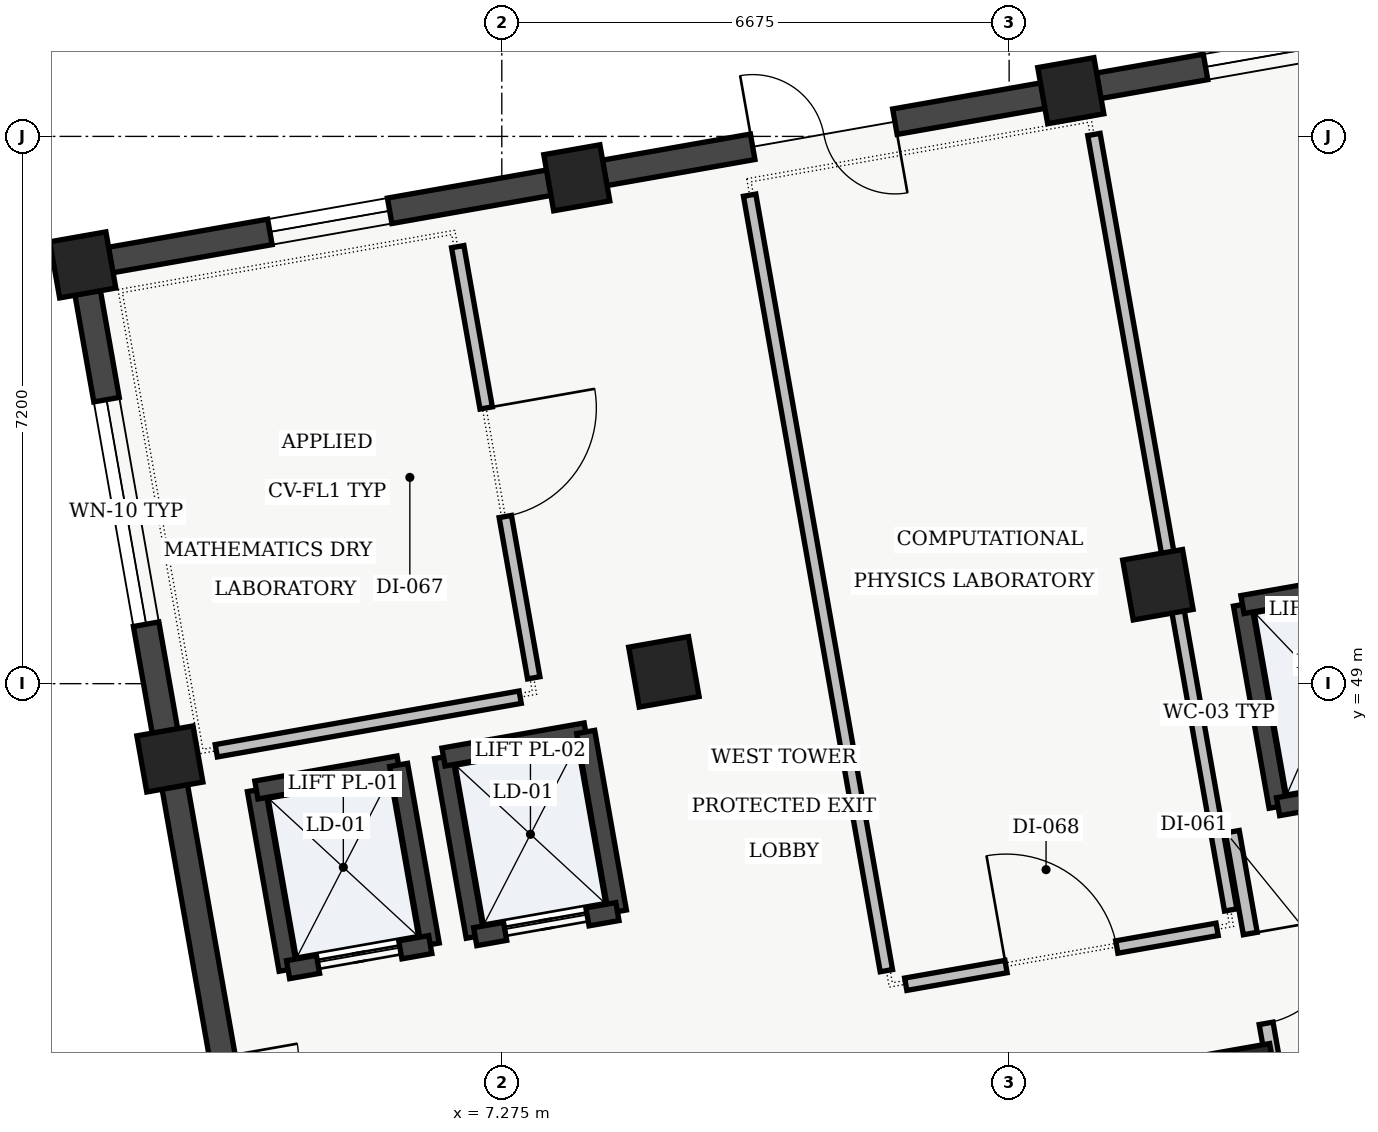
"""IFC4 building model, lengths in metres.
Left out: names, types, materials, properties, quantities, classifications, styles, units other than length and angle.
Written with IfcOpenShell. Run it as: python <this file> out.ifc"""

import sys

from ifc_helpers import new_model, si_unit, direction, frame, frame_2d, origin, origin_2d, place, context, subcontext, project, spatial, rectangle, extrude, element, fill, save


model = new_model("IFC4")
c1 = context("Model", 3, precision=1e-05, world=origin(), true_north=direction((0.0, 1.0)))
c2 = subcontext(c1, "Body", "Model", "MODEL_VIEW")
j1 = project(units=[si_unit("LENGTHUNIT", "METRE"), si_unit("PLANEANGLEUNIT", "RADIAN")], contexts=[c1])
p1 = place(None, origin())
s1 = spatial("IfcSite", under=j1, at=p1, CompositionType="ELEMENT")
p2 = place(p1, origin())
s2 = spatial("IfcBuilding", under=s1, at=p2, CompositionType="ELEMENT")
p3 = place(p2, origin())
s3 = spatial("IfcBuildingStorey", under=s2, at=p3, CompositionType="ELEMENT", Elevation=0.0)
for number, where, z_axis, x_axis in (
    (1, (2.908, 48.01, 0.0), (0.0, 0.0, 1.0), (0.985, 0.174, 0.0)),
    (2, (1.762, 54.509, 0.0), (0.0, 0.0, 1.0), (0.985, 0.174, 0.0)),
):
    element("IfcColumn", number, at=place(p3, frame(where, z_axis=z_axis, x_axis=x_axis)), inside=s3, PredefinedType="COLUMN", context=c2, shape_type="SweptSolid", body=[
        extrude(rectangle(XDim=0.75, YDim=0.75, at=origin_2d()), origin(), (0.0, 0.0, 1.0), 4.92),
    ])
p4 = place(p3, frame((9.407, 49.156, 0.0), z_axis=(0.0, 0.0, 1.0), x_axis=(0.984807753012, 0.173648177667, 0.0)))
e3 = element("IfcColumn", 3, at=p4, inside=s3, PredefinedType="COLUMN", context=c2, shape_type="SweptSolid", body=[
    extrude(rectangle(XDim=0.8, YDim=0.8, at=origin_2d()), origin(), (0.0, 0.0, 1.0), 4.92),
])
p5 = place(p3, frame((8.261, 55.655, 0.0), z_axis=(0.0, 0.0, 1.0), x_axis=(0.984807753012, 0.173648177667, 0.0)))
e4 = element("IfcColumn", 4, at=p5, inside=s3, PredefinedType="COLUMN", context=c2, shape_type="SweptSolid", body=[
    extrude(rectangle(XDim=0.75, YDim=0.75, at=origin_2d()), origin(), (0.0, 0.0, 1.0), 4.92),
])
for number, where, z_axis, x_axis in (
    (5, (17.053, 43.802, 0.0), (0.0, 0.0, 1.0), (0.985, 0.174, 0.0)),
    (6, (15.907, 50.302, 0.0), (0.0, 0.0, 1.0), (0.985, 0.174, 0.0)),
):
    element("IfcColumn", number, at=place(p3, frame(where, z_axis=z_axis, x_axis=x_axis)), inside=s3, PredefinedType="COLUMN", context=c2, shape_type="SweptSolid", body=[
        extrude(rectangle(XDim=0.8, YDim=0.8, at=origin_2d()), origin(), (0.0, 0.0, 1.0), 4.92),
    ])
p6 = place(p3, frame((14.761, 56.801, 0.0), z_axis=(0.0, 0.0, 1.0), x_axis=(0.984807753012, 0.173648177667, 0.0)))
e7 = element("IfcColumn", 7, at=p6, inside=s3, PredefinedType="COLUMN", context=c2, shape_type="SweptSolid", body=[
    extrude(rectangle(XDim=0.75, YDim=0.75, at=origin_2d()), origin(), (0.0, 0.0, 1.0), 4.92),
])
p7 = place(p3, frame((3.99, 41.874, 0.0), z_axis=(0.0, 0.0, 1.0), x_axis=(-0.1736474839, 0.984807875342, 0.0)))
e8 = element("IfcWall", 8, at=p7, inside=s3, PredefinedType="SOLIDWALL", context=c2, shape_type="SweptSolid", body=[
    extrude(rectangle(XDim=5.86, YDim=0.34, at=frame_2d((2.93, 0.0))), origin(), (0.0, 0.0, 1.0), 4.455),
])
p8 = place(p7, frame((0.25, 0.0, 0.0)))
e9 = element("IfcOpeningElement", 9, at=p8, cuts=e8, PredefinedType="OPENING", context=c2, shape_type="SweptSolid", body=[
    extrude(rectangle(XDim=2.0, YDim=2.25, at=frame_2d((1.0, 1.125))), frame((0.0, 0.17, 0.0), z_axis=(0.0, -1.0, 0.0), x_axis=(1.0, 0.0, 0.0)), (0.0, 0.0, 1.0), 0.34),
])
p9 = place(p3, frame((2.844, 48.374, 0.0), z_axis=(0.0, 0.0, 1.0), x_axis=(-0.1736474839, 0.984807875342, 0.0)))
e10 = element("IfcWall", 10, at=p9, inside=s3, PredefinedType="SOLIDWALL", context=c2, shape_type="SweptSolid", body=[
    extrude(rectangle(XDim=5.86, YDim=0.34, at=frame_2d((2.93, 0.0))), origin(), (0.0, 0.0, 1.0), 4.455),
])
p10 = place(p9, frame((1.43, 0.0, 0.95)))
e11 = element("IfcOpeningElement", 11, at=p10, cuts=e10, PredefinedType="OPENING", context=c2, shape_type="SweptSolid", body=[
    extrude(rectangle(XDim=3.0, YDim=1.65, at=frame_2d((1.5, 0.825))), frame((0.0, 0.17, 0.0), z_axis=(0.0, -1.0, 0.0), x_axis=(1.0, 0.0, 0.0)), (0.0, 0.0, 1.0), 0.34),
])
p11 = place(p3, frame((2.126, 54.573, 0.0), z_axis=(0.0, 0.0, 1.0), x_axis=(0.984807875342, 0.1736474839, 0.0)))
e12 = element("IfcWall", 12, at=p11, inside=s3, PredefinedType="SOLIDWALL", context=c2, shape_type="SweptSolid", body=[
    extrude(rectangle(XDim=5.86, YDim=0.34, at=frame_2d((2.93, 0.0))), origin(), (0.0, 0.0, 1.0), 4.455),
])
p12 = place(p11, frame((2.13, 0.0, 0.95)))
e13 = element("IfcOpeningElement", 13, at=p12, cuts=e12, PredefinedType="OPENING", context=c2, shape_type="SweptSolid", body=[
    extrude(rectangle(XDim=1.6, YDim=1.4, at=frame_2d((0.8, 0.7))), frame((0.0, 0.17, 0.0), z_axis=(0.0, -1.0, 0.0), x_axis=(1.0, 0.0, 0.0)), (0.0, 0.0, 1.0), 0.34),
])
p13 = place(p3, frame((8.626, 55.719, 0.0), z_axis=(0.0, 0.0, 1.0), x_axis=(0.98480661901, 0.173654608793, 0.0)))
e14 = element("IfcWall", 14, at=p13, inside=s3, PredefinedType="SOLIDWALL", context=c2, shape_type="SweptSolid", body=[
    extrude(rectangle(XDim=5.86, YDim=0.34, at=frame_2d((2.93, 0.0))), origin(), (0.0, 0.0, 1.0), 4.455),
])
p14 = place(p13, frame((1.98, 0.0, 0.0)))
e15 = element("IfcOpeningElement", 15, at=p14, cuts=e14, PredefinedType="OPENING", context=c2, shape_type="SweptSolid", body=[
    extrude(rectangle(XDim=1.9, YDim=2.25, at=frame_2d((0.95, 1.125))), frame((0.0, 0.17, 0.0), z_axis=(0.0, -1.0, 0.0), x_axis=(1.0, 0.0, 0.0)), (0.0, 0.0, 1.0), 0.34),
])
p15 = place(p3, frame((15.125, 56.865, 0.0), z_axis=(0.0, 0.0, 1.0), x_axis=(0.984807875342, 0.1736474839, 0.0)))
e16 = element("IfcWall", 16, at=p15, inside=s3, PredefinedType="SOLIDWALL", context=c2, shape_type="SweptSolid", body=[
    extrude(rectangle(XDim=5.86, YDim=0.34, at=frame_2d((2.93, 0.0))), origin(), (0.0, 0.0, 1.0), 4.455),
])
p16 = place(p15, frame((1.43, 0.0, 0.95)))
e17 = element("IfcOpeningElement", 17, at=p16, cuts=e16, PredefinedType="OPENING", context=c2, shape_type="SweptSolid", body=[
    extrude(rectangle(XDim=3.0, YDim=1.65, at=frame_2d((1.5, 0.825))), frame((0.0, 0.17, 0.0), z_axis=(0.0, -1.0, 0.0), x_axis=(1.0, 0.0, 0.0)), (0.0, 0.0, 1.0), 0.34),
])
p17 = place(p3, frame((17.488, 47.382, 0.0), z_axis=(0.0, 0.0, 1.0), x_axis=(-0.173615102578, 0.98481358447, 0.0)))
e18 = element("IfcWall", 18, at=p17, inside=s3, PredefinedType="SHEAR", context=c2, shape_type="SweptSolid", body=[
    extrude(rectangle(XDim=2.7, YDim=0.24, at=frame_2d((1.35, 0.0))), origin(), (0.0, 0.0, 1.0), 4.88),
])
p18 = place(p3, frame((17.02, 50.041, 0.0), z_axis=(0.0, 0.0, 1.0), x_axis=(0.984815882103, 0.173602068988, 0.0)))
e19 = element("IfcWall", 19, at=p18, inside=s3, PredefinedType="SHEAR", context=c2, shape_type="SweptSolid", body=[
    extrude(rectangle(XDim=1.9, YDim=0.24, at=frame_2d((0.95, 0.0))), origin(), (0.0, 0.0, 1.0), 4.88),
])
p19 = place(p3, frame((19.359, 47.712, 0.0), z_axis=(0.0, 0.0, 1.0), x_axis=(-0.984815882103, -0.173602068988, 0.0)))
e20 = element("IfcWall", 20, at=p19, inside=s3, PredefinedType="SHEAR", context=c2, shape_type="SweptSolid", body=[
    extrude(rectangle(XDim=1.9, YDim=0.24, at=frame_2d((0.95, 0.0))), origin(), (0.0, 0.0, 1.0), 4.88),
])
p20 = place(p19, frame((0.325, 0.0, 0.0)))
e21 = element("IfcOpeningElement", 21, at=p20, cuts=e20, PredefinedType="OPENING", context=c2, shape_type="SweptSolid", body=[
    extrude(rectangle(XDim=1.25, YDim=2.2, at=frame_2d((0.625, 1.1))), frame((0.0, 0.12, 0.0), z_axis=(0.0, -1.0, 0.0), x_axis=(1.0, 0.0, 0.0)), (0.0, 0.0, 1.0), 0.24),
])
p21 = place(p3, frame((4.463, 45.237, 0.0), z_axis=(0.0, 0.0, 1.0), x_axis=(-0.173646056486, 0.984808127031, 0.0)))
e22 = element("IfcWall", 22, at=p21, inside=s3, PredefinedType="SHEAR", context=c2, shape_type="SweptSolid", body=[
    extrude(rectangle(XDim=2.4, YDim=0.24, at=frame_2d((1.2, 0.0))), origin(), (0.0, 0.0, 1.0), 4.88),
])
p22 = place(p3, frame((4.046, 47.601, 0.0), z_axis=(0.0, 0.0, 1.0), x_axis=(0.984793905749, 0.173726691098, 0.0)))
e23 = element("IfcWall", 23, at=p22, inside=s3, PredefinedType="SHEAR", context=c2, shape_type="SweptSolid", body=[
    extrude(rectangle(XDim=1.9, YDim=0.24, at=frame_2d((0.95, 0.0))), origin(), (0.0, 0.0, 1.0), 4.88),
])
p23 = place(p3, frame((5.917, 47.931, 0.0), z_axis=(0.0, 0.0, 1.0), x_axis=(0.173646056486, -0.984808127031, 0.0)))
e24 = element("IfcWall", 24, at=p23, inside=s3, PredefinedType="SHEAR", context=c2, shape_type="SweptSolid", body=[
    extrude(rectangle(XDim=2.4, YDim=0.24, at=frame_2d((1.2, 0.0))), origin(), (0.0, 0.0, 1.0), 4.88),
])
p24 = place(p3, frame((6.334, 45.567, 0.0), z_axis=(0.0, 0.0, 1.0), x_axis=(-0.984793905749, -0.173726691098, 0.0)))
e25 = element("IfcWall", 25, at=p24, inside=s3, PredefinedType="SHEAR", context=c2, shape_type="SweptSolid", body=[
    extrude(rectangle(XDim=1.9, YDim=0.24, at=frame_2d((0.95, 0.0))), origin(), (0.0, 0.0, 1.0), 4.88),
])
p25 = place(p24, frame((0.4, 0.0, 0.0)))
e26 = element("IfcOpeningElement", 26, at=p25, cuts=e25, PredefinedType="OPENING", context=c2, shape_type="SweptSolid", body=[
    extrude(rectangle(XDim=1.1, YDim=2.2, at=frame_2d((0.55, 1.1))), frame((0.0, 0.12, 0.0), z_axis=(0.0, -1.0, 0.0), x_axis=(1.0, 0.0, 0.0)), (0.0, 0.0, 1.0), 0.24),
])
p26 = place(p3, frame((6.925, 45.671, 0.0), z_axis=(0.0, 0.0, 1.0), x_axis=(-0.173646056486, 0.984808127031, 0.0)))
e27 = element("IfcWall", 27, at=p26, inside=s3, PredefinedType="SHEAR", context=c2, shape_type="SweptSolid", body=[
    extrude(rectangle(XDim=2.4, YDim=0.24, at=frame_2d((1.2, 0.0))), origin(), (0.0, 0.0, 1.0), 4.88),
])
p27 = place(p3, frame((6.508, 48.035, 0.0), z_axis=(0.0, 0.0, 1.0), x_axis=(0.984793905749, 0.173726691098, 0.0)))
e28 = element("IfcWall", 28, at=p27, inside=s3, PredefinedType="SHEAR", context=c2, shape_type="SweptSolid", body=[
    extrude(rectangle(XDim=1.9, YDim=0.24, at=frame_2d((0.95, 0.0))), origin(), (0.0, 0.0, 1.0), 4.88),
])
p28 = place(p3, frame((8.379, 48.365, 0.0), z_axis=(0.0, 0.0, 1.0), x_axis=(0.173646056486, -0.984808127031, 0.0)))
e29 = element("IfcWall", 29, at=p28, inside=s3, PredefinedType="SHEAR", context=c2, shape_type="SweptSolid", body=[
    extrude(rectangle(XDim=2.4, YDim=0.24, at=frame_2d((1.2, 0.0))), origin(), (0.0, 0.0, 1.0), 4.88),
])
p29 = place(p3, frame((8.796, 46.001, 0.0), z_axis=(0.0, 0.0, 1.0), x_axis=(-0.984793905749, -0.173726691098, 0.0)))
e30 = element("IfcWall", 30, at=p29, inside=s3, PredefinedType="SHEAR", context=c2, shape_type="SweptSolid", body=[
    extrude(rectangle(XDim=1.9, YDim=0.24, at=frame_2d((0.95, 0.0))), origin(), (0.0, 0.0, 1.0), 4.88),
])
p30 = place(p29, frame((0.4, 0.0, 0.0)))
e31 = element("IfcOpeningElement", 31, at=p30, cuts=e30, PredefinedType="OPENING", context=c2, shape_type="SweptSolid", body=[
    extrude(rectangle(XDim=1.1, YDim=2.2, at=frame_2d((0.55, 1.1))), frame((0.0, 0.12, 0.0), z_axis=(0.0, -1.0, 0.0), x_axis=(1.0, 0.0, 0.0)), (0.0, 0.0, 1.0), 0.24),
])
p31 = place(p3, frame((16.886, 47.052, 0.0), z_axis=(0.0, 0.0, 1.0), x_axis=(0.173621956536, -0.984812376145, 0.0)))
e32 = element("IfcWall", 32, at=p31, inside=s3, PredefinedType="SOLIDWALL", context=c2, shape_type="SweptSolid", body=[
    extrude(rectangle(XDim=3.41, YDim=0.185, at=frame_2d((1.705, 0.0))), origin(), (0.0, 0.0, 1.0), 4.55),
])
p32 = place(p31, frame((1.36, 0.0, 0.0)))
e33 = element("IfcOpeningElement", 33, at=p32, cuts=e32, PredefinedType="OPENING", context=c2, shape_type="SweptSolid", body=[
    extrude(rectangle(XDim=1.2, YDim=2.15, at=frame_2d((0.6, 1.075))), frame((0.0, 0.093, 0.0), z_axis=(0.0, -1.0, 0.0), x_axis=(1.0, 0.0, 0.0)), (0.0, 0.0, 1.0), 0.185),
])
p33 = place(p3, frame((3.518, 48.117, 0.0), z_axis=(0.0, 0.0, 1.0), x_axis=(0.984816834462, 0.173596666326, 0.0)))
e34 = element("IfcWall", 34, at=p33, inside=s3, PredefinedType="PARTITIONING", context=c2, shape_type="SweptSolid", body=[
    extrude(rectangle(XDim=4.06, YDim=0.165, at=frame_2d((2.03, 0.0))), origin(), (0.0, 0.0, 1.0), 4.155),
])
p34 = place(p3, frame((7.695, 49.077, 0.0), z_axis=(0.0, 0.0, 1.0), x_axis=(-0.173649928941, 0.984807444214, 0.0)))
e35 = element("IfcWall", 35, at=p34, inside=s3, PredefinedType="PARTITIONING", context=c2, shape_type="SweptSolid", body=[
    extrude(rectangle(XDim=5.76, YDim=0.165, at=frame_2d((2.88, 0.0))), origin(), (0.0, 0.0, 1.0), 4.55),
])
p35 = place(p34, frame((2.155, 0.0, 0.0)))
e36 = element("IfcOpeningElement", 36, at=p35, cuts=e35, PredefinedType="OPENING", context=c2, shape_type="SweptSolid", body=[
    extrude(rectangle(XDim=1.45, YDim=2.08, at=frame_2d((0.725, 1.04))), frame((0.0, 0.083, 0.0), z_axis=(0.0, -1.0, 0.0), x_axis=(1.0, 0.0, 0.0)), (0.0, 0.0, 1.0), 0.165),
])
p36 = place(p3, frame((12.59, 45.046, 0.0), z_axis=(0.0, 0.0, 1.0), x_axis=(0.984805411783, 0.173661454915, 0.0)))
e37 = element("IfcWall", 37, at=p36, inside=s3, PredefinedType="PARTITIONING", context=c2, shape_type="SweptSolid", body=[
    extrude(rectangle(XDim=4.16, YDim=0.165, at=frame_2d((2.08, 0.0))), origin(), (0.0, 0.0, 1.0), 4.505),
])
p37 = place(p36, frame((1.34, 0.0, 0.0)))
e38 = element("IfcOpeningElement", 38, at=p37, cuts=e37, PredefinedType="OPENING", context=c2, shape_type="SweptSolid", body=[
    extrude(rectangle(XDim=1.48, YDim=2.1, at=frame_2d((0.74, 1.05))), frame((0.0, 0.083, 0.0), z_axis=(0.0, -1.0, 0.0), x_axis=(1.0, 0.0, 0.0)), (0.0, 0.0, 1.0), 0.165),
])
p38 = place(p3, frame((16.865, 46.023, 0.0), z_axis=(0.0, 0.0, 1.0), x_axis=(-0.173632075677, 0.984810592092, 0.0)))
e39 = element("IfcWall", 39, at=p38, inside=s3, PredefinedType="PARTITIONING", context=c2, shape_type="SweptSolid", body=[
    extrude(rectangle(XDim=10.36, YDim=0.165, at=frame_2d((5.18, 0.0))), origin(), (0.0, 0.0, 1.0), 4.255),
])
p39 = place(p3, frame((10.536, 55.427, 0.0), z_axis=(0.0, 0.0, 1.0), x_axis=(0.173654930775, -0.984806562233, 0.0)))
e40 = element("IfcWall", 40, at=p39, inside=s3, PredefinedType="PARTITIONING", context=c2, shape_type="SweptSolid", body=[
    extrude(rectangle(XDim=10.36, YDim=0.165, at=frame_2d((5.18, 0.0))), origin(), (0.0, 0.0, 1.0), 4.55),
])
p40 = place(p10, origin())
e41 = element("IfcWindow", 41, at=p40, inside=s3, PartitioningType="SINGLE_PANEL", PredefinedType="WINDOW", context=c2, shape_type="SweptSolid", body=[
    extrude(rectangle(XDim=3.0, YDim=1.65, at=frame_2d((1.5, 0.825))), frame((0.0, 0.03, 0.0), z_axis=(0.0, -1.0, 0.0), x_axis=(1.0, 0.0, 0.0)), (0.0, 0.0, 1.0), 0.06),
])
fill(e11, e41)
p41 = place(p12, origin())
e42 = element("IfcWindow", 42, at=p41, inside=s3, PartitioningType="SINGLE_PANEL", PredefinedType="WINDOW", context=c2, shape_type="SweptSolid", body=[
    extrude(rectangle(XDim=1.6, YDim=1.4, at=frame_2d((0.8, 0.7))), frame((0.0, 0.03, 0.0), z_axis=(0.0, -1.0, 0.0), x_axis=(1.0, 0.0, 0.0)), (0.0, 0.0, 1.0), 0.06),
])
fill(e13, e42)
p42 = place(p14, origin())
e43 = element("IfcDoor", 43, at=p42, inside=s3, OperationType="DOUBLE_DOOR_SINGLE_SWING", PredefinedType="DOOR", context=c2, shape_type="SweptSolid", body=[
    extrude(rectangle(XDim=1.9, YDim=2.25, at=frame_2d((0.95, 1.125))), frame((0.0, 0.025, 0.0), z_axis=(0.0, -1.0, 0.0), x_axis=(1.0, 0.0, 0.0)), (0.0, 0.0, 1.0), 0.05),
])
fill(e15, e43)
p43 = place(p16, origin())
e44 = element("IfcWindow", 44, at=p43, inside=s3, PartitioningType="SINGLE_PANEL", PredefinedType="WINDOW", context=c2, shape_type="SweptSolid", body=[
    extrude(rectangle(XDim=3.0, YDim=1.65, at=frame_2d((1.5, 0.825))), frame((0.0, 0.03, 0.0), z_axis=(0.0, -1.0, 0.0), x_axis=(1.0, 0.0, 0.0)), (0.0, 0.0, 1.0), 0.06),
])
fill(e17, e44)
p44 = place(p25, origin())
e45 = element("IfcDoor", 45, at=p44, inside=s3, OperationType="SLIDING_TO_LEFT", PredefinedType="DOOR", context=c2, shape_type="SweptSolid", body=[
    extrude(rectangle(XDim=1.1, YDim=2.2, at=frame_2d((0.55, 1.1))), frame((0.0, 0.025, 0.0), z_axis=(0.0, -1.0, 0.0), x_axis=(1.0, 0.0, 0.0)), (0.0, 0.0, 1.0), 0.05),
])
fill(e26, e45)
p45 = place(p30, origin())
e46 = element("IfcDoor", 46, at=p45, inside=s3, OperationType="SLIDING_TO_LEFT", PredefinedType="DOOR", context=c2, shape_type="SweptSolid", body=[
    extrude(rectangle(XDim=1.1, YDim=2.2, at=frame_2d((0.55, 1.1))), frame((0.0, 0.025, 0.0), z_axis=(0.0, -1.0, 0.0), x_axis=(1.0, 0.0, 0.0)), (0.0, 0.0, 1.0), 0.05),
])
fill(e31, e46)
p46 = place(p32, origin())
e47 = element("IfcDoor", 47, at=p46, inside=s3, OperationType="SINGLE_SWING_LEFT", PredefinedType="DOOR", context=c2, shape_type="SweptSolid", body=[
    extrude(rectangle(XDim=1.2, YDim=2.15, at=frame_2d((0.6, 1.075))), frame((0.0, 0.025, 0.0), z_axis=(0.0, -1.0, 0.0), x_axis=(1.0, 0.0, 0.0)), (0.0, 0.0, 1.0), 0.05),
])
fill(e33, e47)
p47 = place(p35, origin())
e48 = element("IfcDoor", 48, at=p47, inside=s3, OperationType="SINGLE_SWING_RIGHT", PredefinedType="DOOR", context=c2, shape_type="SweptSolid", body=[
    extrude(rectangle(XDim=1.45, YDim=2.08, at=frame_2d((0.725, 1.04))), frame((0.0, 0.025, 0.0), z_axis=(0.0, -1.0, 0.0), x_axis=(1.0, 0.0, 0.0)), (0.0, 0.0, 1.0), 0.05),
])
fill(e36, e48)
p48 = place(p37, origin())
e49 = element("IfcDoor", 49, at=p48, inside=s3, OperationType="SINGLE_SWING_LEFT", PredefinedType="DOOR", context=c2, shape_type="SweptSolid", body=[
    extrude(rectangle(XDim=1.48, YDim=2.1, at=frame_2d((0.74, 1.05))), frame((0.0, 0.025, 0.0), z_axis=(0.0, -1.0, 0.0), x_axis=(1.0, 0.0, 0.0)), (0.0, 0.0, 1.0), 0.05),
])
fill(e38, e49)
save(model, sys.argv[1])
